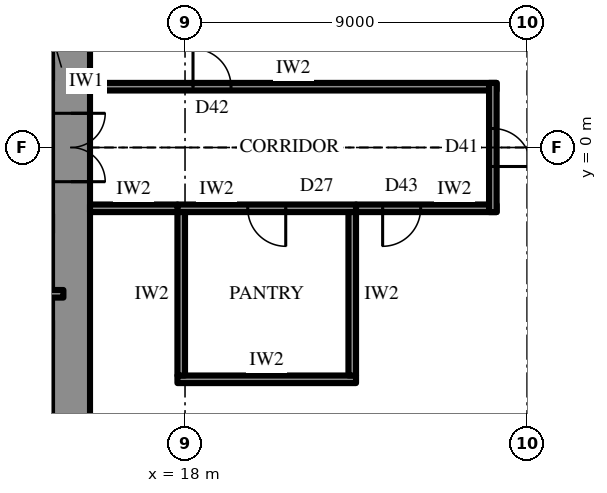
"""IFC4 building model, lengths in metres.
Left out: names, types, materials, properties, quantities, classifications, styles, units other than length and angle.
Written with IfcOpenShell. Run it as: python <this file> out.ifc"""

import sys

from ifc_helpers import new_model, si_unit, direction, frame, frame_2d, origin, place, context, subcontext, project, spatial, rectangle, extrude, element, fill, save


model = new_model("IFC4")
c1 = context("Model", 3, precision=1e-05, world=origin(), true_north=direction((0.0, 1.0)))
c2 = subcontext(c1, "Body", "Model", "MODEL_VIEW")
j1 = project(units=[si_unit("LENGTHUNIT", "METRE"), si_unit("PLANEANGLEUNIT", "RADIAN")], contexts=[c1])
p1 = place(None, origin())
s1 = spatial("IfcSite", under=j1, at=p1, CompositionType="ELEMENT")
p2 = place(p1, origin())
s2 = spatial("IfcBuilding", under=s1, at=p2, CompositionType="ELEMENT")
p3 = place(p2, frame((0.0, 0.0, 274.3)))
s3 = spatial("IfcBuildingStorey", under=s2, at=p3, CompositionType="ELEMENT", Elevation=274.3)
p4 = place(p3, frame((15.0, -10.7, 0.0), z_axis=(0.0, 0.0, 1.0), x_axis=(0.0, 1.0, 0.0)))
e1 = element("IfcWall", 1, at=p4, inside=s3, PredefinedType="SHEAR", context=c2, shape_type="SweptSolid", body=[
    extrude(rectangle(XDim=21.4, YDim=1.0, at=frame_2d((10.7, 0.0))), origin(), (0.0, 0.0, 1.0), 4.2),
])
p5 = place(p4, frame((9.8, 0.0, 0.0)))
e2 = element("IfcOpeningElement", 2, at=p5, cuts=e1, PredefinedType="OPENING", context=c2, shape_type="SweptSolid", body=[
    extrude(rectangle(XDim=1.8, YDim=2.4, at=frame_2d((0.9, 1.2))), frame((0.0, 0.51, 0.0), z_axis=(0.0, -1.0, 0.0), x_axis=(1.0, 0.0, 0.0)), (0.0, 0.0, 1.0), 1.02),
])
p6 = place(p3, frame((12.3, 2.0, 0.0), z_axis=(0.0, 0.0, 1.0), x_axis=(1.0, 0.0, 0.0)))
e3 = element("IfcWall", 3, at=p6, inside=s3, PredefinedType="SHEAR", context=c2, shape_type="SweptSolid", body=[
    extrude(rectangle(XDim=2.2, YDim=0.5, at=frame_2d((1.1, 0.0))), origin(), (0.0, 0.0, 1.0), 4.2),
])
p7 = place(p6, frame((0.8, 0.0, 0.0)))
e4 = element("IfcOpeningElement", 4, at=p7, cuts=e3, PredefinedType="OPENING", context=c2, shape_type="SweptSolid", body=[
    extrude(rectangle(XDim=0.9, YDim=2.2, at=frame_2d((0.45, 1.1))), frame((0.0, 0.26, 0.0), z_axis=(0.0, -1.0, 0.0), x_axis=(1.0, 0.0, 0.0)), (0.0, 0.0, 1.0), 0.52),
])
p8 = place(p3, frame((18.707, -25.299, 0.0), z_axis=(0.0, 0.0, 1.0), x_axis=(0.500000442367, 0.866025148383, 0.0)))
e5 = element("IfcWall", 5, at=p8, inside=s3, PredefinedType="SOLIDWALL", context=c2, shape_type="SweptSolid", body=[
    extrude(rectangle(XDim=25.113, YDim=0.3, at=frame_2d((12.556, 0.0))), origin(), (0.0, 0.0, 1.0), 2.8),
])
p9 = place(p8, frame((4.278, 0.0, 0.6)))
e6 = element("IfcOpeningElement", 6, at=p9, cuts=e5, PredefinedType="OPENING", context=c2, shape_type="SweptSolid", body=[
    extrude(rectangle(XDim=2.7, YDim=1.95, at=frame_2d((1.35, 0.975))), frame((0.0, 0.16, 0.0), z_axis=(0.0, -1.0, 0.0), x_axis=(1.0, 0.0, 0.0)), (0.0, 0.0, 1.0), 0.32),
])
p10 = place(p8, frame((9.647, 0.0, 0.0)))
e7 = element("IfcOpeningElement", 7, at=p10, cuts=e5, PredefinedType="OPENING", context=c2, shape_type="SweptSolid", body=[
    extrude(rectangle(XDim=1.2, YDim=2.4, at=frame_2d((0.6, 1.2))), frame((0.0, 0.16, 0.0), z_axis=(0.0, -1.0, 0.0), x_axis=(1.0, 0.0, 0.0)), (0.0, 0.0, 1.0), 0.32),
])
p11 = place(p8, frame((13.516, 0.0, 0.6)))
e8 = element("IfcOpeningElement", 8, at=p11, cuts=e5, PredefinedType="OPENING", context=c2, shape_type="SweptSolid", body=[
    extrude(rectangle(XDim=2.7, YDim=1.95, at=frame_2d((1.35, 0.975))), frame((0.0, 0.16, 0.0), z_axis=(0.0, -1.0, 0.0), x_axis=(1.0, 0.0, 0.0)), (0.0, 0.0, 1.0), 0.32),
])
p12 = place(p8, frame((18.135, 0.0, 0.6)))
e9 = element("IfcOpeningElement", 9, at=p12, cuts=e5, PredefinedType="OPENING", context=c2, shape_type="SweptSolid", body=[
    extrude(rectangle(XDim=2.7, YDim=1.95, at=frame_2d((1.35, 0.975))), frame((0.0, 0.16, 0.0), z_axis=(0.0, -1.0, 0.0), x_axis=(1.0, 0.0, 0.0)), (0.0, 0.0, 1.0), 0.32),
])
p13 = place(p3, frame((14.8, -3.85, 0.0), z_axis=(0.0, 0.0, 1.0), x_axis=(-1.0, 0.0, 0.0)))
e10 = element("IfcWall", 10, at=p13, inside=s3, PredefinedType="PARTITIONING", context=c2, shape_type="SweptSolid", body=[
    extrude(rectangle(XDim=2.5, YDim=0.2, at=frame_2d((1.25, 0.0))), origin(), (0.0, 0.0, 1.0), 4.0),
])
p14 = place(p3, frame((17.8, -1.6, 0.0), z_axis=(0.0, 0.0, 1.0), x_axis=(1.0, 0.0, 0.0)))
e11 = element("IfcWall", 11, at=p14, inside=s3, PredefinedType="PARTITIONING", context=c2, shape_type="SweptSolid", body=[
    extrude(rectangle(XDim=4.7, YDim=0.2, at=frame_2d((2.35, 0.0))), origin(), (0.0, 0.0, 1.0), 4.0),
])
p15 = place(p14, frame((1.85, 0.0, 0.0)))
e12 = element("IfcOpeningElement", 12, at=p15, cuts=e11, PredefinedType="OPENING", context=c2, shape_type="SweptSolid", body=[
    extrude(rectangle(XDim=1.0, YDim=2.2, at=frame_2d((0.5, 1.1))), frame((0.0, 0.11, 0.0), z_axis=(0.0, -1.0, 0.0), x_axis=(1.0, 0.0, 0.0)), (0.0, 0.0, 1.0), 0.22),
])
p16 = place(p3, frame((17.8, -6.1, 0.0), z_axis=(0.0, 0.0, 1.0), x_axis=(1.0, 0.0, 0.0)))
e13 = element("IfcWall", 13, at=p16, inside=s3, PredefinedType="PARTITIONING", context=c2, shape_type="SweptSolid", body=[
    extrude(rectangle(XDim=4.7, YDim=0.2, at=frame_2d((2.35, 0.0))), origin(), (0.0, 0.0, 1.0), 4.0),
])
for number, where, z_axis, x_axis in (
    (14, (17.9, -1.7, 0.0), (0.0, 0.0, 1.0), (0.0, -1.0, 0.0)),
    (15, (22.4, -1.7, 0.0), (0.0, 0.0, 1.0), (0.0, -1.0, 0.0)),
):
    element("IfcWall", number, at=place(p3, frame(where, z_axis=z_axis, x_axis=x_axis)), inside=s3, PredefinedType="PARTITIONING", context=c2, shape_type="SweptSolid", body=[
        extrude(rectangle(XDim=4.3, YDim=0.2, at=frame_2d((2.15, 0.0))), origin(), (0.0, 0.0, 1.0), 4.0),
    ])
p17 = place(p3, frame((15.5, 1.6, 0.0), z_axis=(0.0, 0.0, 1.0), x_axis=(1.0, 0.0, 0.0)))
e16 = element("IfcWall", 16, at=p17, inside=s3, PredefinedType="PARTITIONING", context=c2, shape_type="SweptSolid", body=[
    extrude(rectangle(XDim=10.7, YDim=0.2, at=frame_2d((5.35, 0.0))), origin(), (0.0, 0.0, 1.0), 4.0),
])
p18 = place(p17, frame((2.71, 0.0, 0.0)))
e17 = element("IfcOpeningElement", 17, at=p18, cuts=e16, PredefinedType="OPENING", context=c2, shape_type="SweptSolid", body=[
    extrude(rectangle(XDim=1.0, YDim=2.2, at=frame_2d((0.5, 1.1))), frame((0.0, 0.11, 0.0), z_axis=(0.0, -1.0, 0.0), x_axis=(1.0, 0.0, 0.0)), (0.0, 0.0, 1.0), 0.22),
])
p19 = place(p3, frame((15.5, -1.6, 0.0), z_axis=(0.0, 0.0, 1.0), x_axis=(1.0, 0.0, 0.0)))
e18 = element("IfcWall", 18, at=p19, inside=s3, PredefinedType="PARTITIONING", context=c2, shape_type="SweptSolid", body=[
    extrude(rectangle(XDim=2.3, YDim=0.2, at=frame_2d((1.15, 0.0))), origin(), (0.0, 0.0, 1.0), 4.0),
])
p20 = place(p3, frame((22.5, -1.6, 0.0), z_axis=(0.0, 0.0, 1.0), x_axis=(1.0, 0.0, 0.0)))
e19 = element("IfcWall", 19, at=p20, inside=s3, PredefinedType="PARTITIONING", context=c2, shape_type="SweptSolid", body=[
    extrude(rectangle(XDim=3.7, YDim=0.2, at=frame_2d((1.85, 0.0))), origin(), (0.0, 0.0, 1.0), 4.0),
])
p21 = place(p20, frame((0.7, 0.0, 0.0)))
e20 = element("IfcOpeningElement", 20, at=p21, cuts=e19, PredefinedType="OPENING", context=c2, shape_type="SweptSolid", body=[
    extrude(rectangle(XDim=1.0, YDim=2.2, at=frame_2d((0.5, 1.1))), frame((0.0, 0.11, 0.0), z_axis=(0.0, -1.0, 0.0), x_axis=(1.0, 0.0, 0.0)), (0.0, 0.0, 1.0), 0.22),
])
p22 = place(p3, frame((26.1, -1.7, 0.0), z_axis=(0.0, 0.0, 1.0), x_axis=(0.0, 1.0, 0.0)))
e21 = element("IfcWall", 21, at=p22, inside=s3, PredefinedType="PARTITIONING", context=c2, shape_type="SweptSolid", body=[
    extrude(rectangle(XDim=3.4, YDim=0.2, at=frame_2d((1.7, 0.0))), origin(), (0.0, 0.0, 1.0), 4.0),
])
p23 = place(p22, frame((1.2, 0.0, 0.0)))
e22 = element("IfcOpeningElement", 22, at=p23, cuts=e21, PredefinedType="OPENING", context=c2, shape_type="SweptSolid", body=[
    extrude(rectangle(XDim=1.0, YDim=2.2, at=frame_2d((0.5, 1.1))), frame((0.0, 0.11, 0.0), z_axis=(0.0, -1.0, 0.0), x_axis=(1.0, 0.0, 0.0)), (0.0, 0.0, 1.0), 0.22),
])
p24 = place(p5, frame((1.8, 0.0, 0.0), z_axis=(0.0, 0.0, 1.0), x_axis=(-1.0, 0.0, 0.0)))
e23 = element("IfcDoor", 23, at=p24, inside=s3, OperationType="DOUBLE_DOOR_SINGLE_SWING", PredefinedType="DOOR", context=c2, shape_type="SweptSolid", body=[
    extrude(rectangle(XDim=1.8, YDim=2.4, at=frame_2d((0.9, 1.2))), frame((0.0, 0.025, 0.0), z_axis=(0.0, -1.0, 0.0), x_axis=(1.0, 0.0, 0.0)), (0.0, 0.0, 1.0), 0.05),
])
fill(e2, e23)
p25 = place(p15, frame((1.0, 0.0, 0.0), z_axis=(0.0, 0.0, 1.0), x_axis=(-1.0, 0.0, 0.0)))
e24 = element("IfcDoor", 24, at=p25, inside=s3, OperationType="SINGLE_SWING_RIGHT", PredefinedType="DOOR", context=c2, shape_type="SweptSolid", body=[
    extrude(rectangle(XDim=1.0, YDim=2.2, at=frame_2d((0.5, 1.1))), frame((0.0, 0.025, 0.0), z_axis=(0.0, -1.0, 0.0), x_axis=(1.0, 0.0, 0.0)), (0.0, 0.0, 1.0), 0.05),
])
fill(e12, e24)
p26 = place(p18, origin())
e25 = element("IfcDoor", 25, at=p26, inside=s3, OperationType="SINGLE_SWING_RIGHT", PredefinedType="DOOR", context=c2, shape_type="SweptSolid", body=[
    extrude(rectangle(XDim=1.0, YDim=2.2, at=frame_2d((0.5, 1.1))), frame((0.0, 0.025, 0.0), z_axis=(0.0, -1.0, 0.0), x_axis=(1.0, 0.0, 0.0)), (0.0, 0.0, 1.0), 0.05),
])
fill(e17, e25)
p27 = place(p21, frame((1.0, 0.0, 0.0), z_axis=(0.0, 0.0, 1.0), x_axis=(-1.0, 0.0, 0.0)))
e26 = element("IfcDoor", 26, at=p27, inside=s3, OperationType="SINGLE_SWING_LEFT", PredefinedType="DOOR", context=c2, shape_type="SweptSolid", body=[
    extrude(rectangle(XDim=1.0, YDim=2.2, at=frame_2d((0.5, 1.1))), frame((0.0, 0.025, 0.0), z_axis=(0.0, -1.0, 0.0), x_axis=(1.0, 0.0, 0.0)), (0.0, 0.0, 1.0), 0.05),
])
fill(e20, e26)
p28 = place(p23, frame((1.0, 0.0, 0.0), z_axis=(0.0, 0.0, 1.0), x_axis=(-1.0, 0.0, 0.0)))
e27 = element("IfcDoor", 27, at=p28, inside=s3, OperationType="SINGLE_SWING_LEFT", PredefinedType="DOOR", context=c2, shape_type="SweptSolid", body=[
    extrude(rectangle(XDim=1.0, YDim=2.2, at=frame_2d((0.5, 1.1))), frame((0.0, 0.025, 0.0), z_axis=(0.0, -1.0, 0.0), x_axis=(1.0, 0.0, 0.0)), (0.0, 0.0, 1.0), 0.05),
])
fill(e22, e27)
save(model, sys.argv[1])
